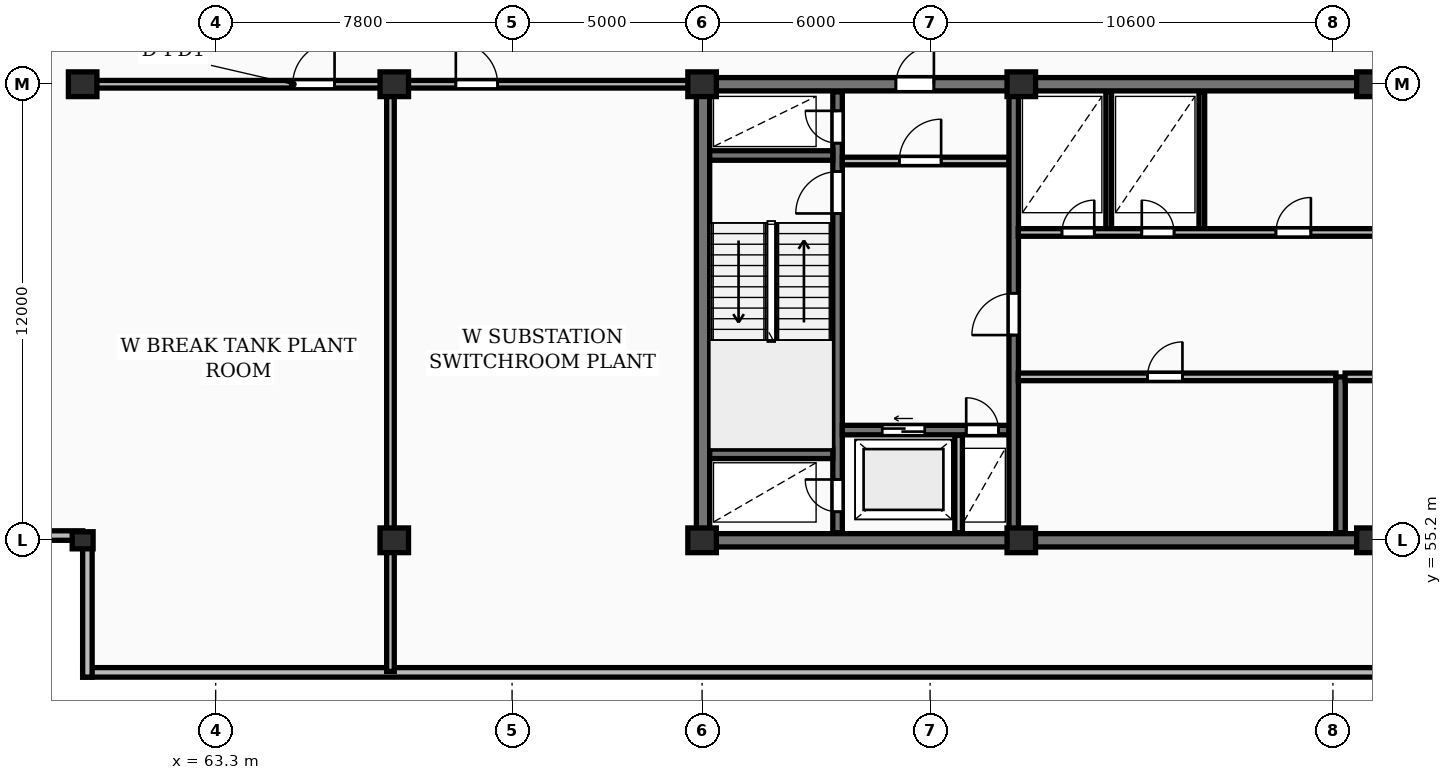
"""IFC4 building model, lengths in metres.
Left out: names, types, materials, properties, quantities, classifications, styles, units other than length and angle.
Written with IfcOpenShell. Run it as: python <this file> out.ifc"""

import sys

from ifc_helpers import new_model, si_unit, direction, frame, frame_2d, origin, origin_2d, place, context, subcontext, project, spatial, rectangle, extrude, element, fill, save


model = new_model("IFC4")
c1 = context("Model", 3, precision=1e-05, world=origin(), true_north=direction((0.0, 1.0)))
c2 = subcontext(c1, "Body", "Model", "MODEL_VIEW")
j1 = project(units=[si_unit("LENGTHUNIT", "METRE"), si_unit("PLANEANGLEUNIT", "RADIAN")], contexts=[c1])
p1 = place(None, origin())
s1 = spatial("IfcSite", under=j1, at=p1, CompositionType="ELEMENT")
p2 = place(p1, origin())
s2 = spatial("IfcBuilding", under=s1, at=p2, CompositionType="ELEMENT")
p3 = place(p2, frame((0.0, 0.0, 259.7)))
s3 = spatial("IfcBuildingStorey", under=s2, at=p3, CompositionType="ELEMENT", Elevation=259.7)
p4 = place(p3, frame((59.8, 55.2, 0.0), z_axis=(0.0, 0.0, 1.0), x_axis=(1.0, 0.0, 0.0)))
e1 = element("IfcColumn", 1, at=p4, inside=s3, PredefinedType="PILASTER", context=c2, shape_type="SweptSolid", body=[
    extrude(rectangle(XDim=0.55, YDim=0.45, at=origin_2d()), origin(), (0.0, 0.0, 1.0), 4.5),
])
for number, where, z_axis, x_axis in (
    (2, (59.8, 67.2, 0.0), (0.0, 0.0, 1.0), (1.0, 0.0, 0.0)),
    (3, (68.0, 55.2, 0.0), (0.0, 0.0, 1.0), (1.0, 0.0, 0.0)),
    (4, (68.0, 67.2, 0.0), (0.0, 0.0, 1.0), (1.0, 0.0, 0.0)),
    (5, (76.1, 55.2, 0.0), (0.0, 0.0, 1.0), (1.0, 0.0, 0.0)),
    (6, (76.1, 67.2, 0.0), (0.0, 0.0, 1.0), (1.0, 0.0, 0.0)),
    (7, (84.5, 55.2, 0.0), (0.0, 0.0, 1.0), (1.0, 0.0, 0.0)),
    (8, (84.5, 67.2, 0.0), (0.0, 0.0, 1.0), (1.0, 0.0, 0.0)),
    (9, (93.7, 55.2, 0.0), (0.0, 0.0, 1.0), (1.0, 0.0, 0.0)),
    (10, (93.7, 67.2, 0.0), (0.0, 0.0, 1.0), (1.0, 0.0, 0.0)),
):
    element("IfcColumn", number, at=place(p3, frame(where, z_axis=z_axis, x_axis=x_axis)), inside=s3, PredefinedType="COLUMN", context=c2, shape_type="SweptSolid", body=[
        extrude(rectangle(XDim=0.75, YDim=0.65, at=origin_2d()), origin(), (0.0, 0.0, 1.0), 4.5),
    ])
p5 = place(p3, frame((59.8, 51.725, 0.0), z_axis=(0.0, 0.0, 1.0), x_axis=(1.0, 0.0, 0.0)))
e11 = element("IfcWall", 11, at=p5, inside=s3, PredefinedType="SHEAR", context=c2, shape_type="SweptSolid", body=[
    extrude(rectangle(XDim=68.6, YDim=0.25, at=frame_2d((34.3, 0.0))), origin(), (0.0, 0.0, 1.0), 4.23),
])
p6 = place(p3, frame((56.2, 55.325, 0.0), z_axis=(0.0, 0.0, 1.0), x_axis=(1.0, 0.0, 0.0)))
e12 = element("IfcWall", 12, at=p6, inside=s3, PredefinedType="SHEAR", context=c2, shape_type="SweptSolid", body=[
    extrude(rectangle(XDim=3.6, YDim=0.25, at=frame_2d((1.8, 0.0))), origin(), (0.0, 0.0, 1.0), 4.23),
])
p7 = place(p3, frame((59.925, 55.2, 0.0), z_axis=(0.0, 0.0, 1.0), x_axis=(0.0, -1.0, 0.0)))
e13 = element("IfcWall", 13, at=p7, inside=s3, PredefinedType="SHEAR", context=c2, shape_type="SweptSolid", body=[
    extrude(rectangle(XDim=3.6, YDim=0.25, at=frame_2d((1.8, 0.0))), origin(), (0.0, 0.0, 1.0), 4.23),
])
p8 = place(p3, frame((75.95, 55.2, 0.0), z_axis=(0.0, 0.0, 1.0), x_axis=(1.0, 0.0, 0.0)))
e14 = element("IfcWall", 14, at=p8, inside=s3, PredefinedType="SHEAR", context=c2, shape_type="SweptSolid", body=[
    extrude(rectangle(XDim=36.3, YDim=0.35, at=frame_2d((18.15, 0.0))), origin(), (0.0, 0.0, 1.0), 4.5),
])
p9 = place(p3, frame((76.125, 55.375, 0.0), z_axis=(0.0, 0.0, 1.0), x_axis=(0.0, 1.0, 0.0)))
e15 = element("IfcWall", 15, at=p9, inside=s3, PredefinedType="SHEAR", context=c2, shape_type="SweptSolid", body=[
    extrude(rectangle(XDim=11.65, YDim=0.35, at=frame_2d((5.825, 0.0))), origin(), (0.0, 0.0, 1.0), 4.5),
])
p10 = place(p3, frame((75.95, 67.2, 0.0), z_axis=(0.0, 0.0, 1.0), x_axis=(1.0, 0.0, 0.0)))
e16 = element("IfcWall", 16, at=p10, inside=s3, PredefinedType="SHEAR", context=c2, shape_type="SweptSolid", body=[
    extrude(rectangle(XDim=36.3, YDim=0.35, at=frame_2d((18.15, 0.0))), origin(), (0.0, 0.0, 1.0), 4.5),
])
p11 = place(p10, frame((5.25, 0.0, 0.0)))
e17 = element("IfcOpeningElement", 17, at=p11, cuts=e16, PredefinedType="OPENING", context=c2, shape_type="SweptSolid", body=[
    extrude(rectangle(XDim=1.0, YDim=2.15, at=frame_2d((0.5, 1.075))), frame((0.0, 0.185, 0.0), z_axis=(0.0, -1.0, 0.0), x_axis=(1.0, 0.0, 0.0)), (0.0, 0.0, 1.0), 0.37),
])
p12 = place(p10, frame((21.6, 0.0, 0.0)))
e18 = element("IfcOpeningElement", 18, at=p12, cuts=e16, PredefinedType="OPENING", context=c2, shape_type="SweptSolid", body=[
    extrude(rectangle(XDim=1.5, YDim=2.2, at=frame_2d((0.75, 1.1))), frame((0.0, 0.185, 0.0), z_axis=(0.0, -1.0, 0.0), x_axis=(1.0, 0.0, 0.0)), (0.0, 0.0, 1.0), 0.37),
])
p13 = place(p10, frame((30.45, 0.0, 0.0)))
e19 = element("IfcOpeningElement", 19, at=p13, cuts=e16, PredefinedType="OPENING", context=c2, shape_type="SweptSolid", body=[
    extrude(rectangle(XDim=1.0, YDim=2.15, at=frame_2d((0.5, 1.075))), frame((0.0, 0.185, 0.0), z_axis=(0.0, -1.0, 0.0), x_axis=(1.0, 0.0, 0.0)), (0.0, 0.0, 1.0), 0.37),
])
p14 = place(p3, frame((79.665, 55.4, 0.0), z_axis=(0.0, 0.0, 1.0), x_axis=(0.0, 1.0, 0.0)))
e20 = element("IfcWall", 20, at=p14, inside=s3, PredefinedType="SHEAR", context=c2, shape_type="SweptSolid", body=[
    extrude(rectangle(XDim=11.6, YDim=0.25, at=frame_2d((5.8, 0.0))), origin(), (0.0, 0.0, 1.0), 4.5),
])
p15 = place(p14, frame((0.55, 0.0, 0.0)))
e21 = element("IfcOpeningElement", 21, at=p15, cuts=e20, PredefinedType="OPENING", context=c2, shape_type="SweptSolid", body=[
    extrude(rectangle(XDim=0.85, YDim=2.05, at=frame_2d((0.425, 1.025))), frame((0.0, 0.135, 0.0), z_axis=(0.0, -1.0, 0.0), x_axis=(1.0, 0.0, 0.0)), (0.0, 0.0, 1.0), 0.27),
])
p16 = place(p14, frame((8.4, 0.0, 0.0)))
e22 = element("IfcOpeningElement", 22, at=p16, cuts=e20, PredefinedType="OPENING", context=c2, shape_type="SweptSolid", body=[
    extrude(rectangle(XDim=1.1, YDim=2.1, at=frame_2d((0.55, 1.05))), frame((0.0, 0.135, 0.0), z_axis=(0.0, -1.0, 0.0), x_axis=(1.0, 0.0, 0.0)), (0.0, 0.0, 1.0), 0.27),
])
p17 = place(p14, frame((10.25, 0.0, 0.0)))
e23 = element("IfcOpeningElement", 23, at=p17, cuts=e20, PredefinedType="OPENING", context=c2, shape_type="SweptSolid", body=[
    extrude(rectangle(XDim=0.85, YDim=2.05, at=frame_2d((0.425, 1.025))), frame((0.0, 0.135, 0.0), z_axis=(0.0, -1.0, 0.0), x_axis=(1.0, 0.0, 0.0)), (0.0, 0.0, 1.0), 0.27),
])
for number, where, z_axis, x_axis in (
    (24, (76.3, 57.475, 0.0), (0.0, 0.0, 1.0), (1.0, 0.0, 0.0)),
    (25, (76.3, 65.325, 0.0), (0.0, 0.0, 1.0), (1.0, 0.0, 0.0)),
):
    element("IfcWall", number, at=place(p3, frame(where, z_axis=z_axis, x_axis=x_axis)), inside=s3, PredefinedType="SHEAR", context=c2, shape_type="SweptSolid", body=[
        extrude(rectangle(XDim=3.24, YDim=0.25, at=frame_2d((1.62, 0.0))), origin(), (0.0, 0.0, 1.0), 4.5),
    ])
p18 = place(p3, frame((79.79, 58.1, 0.0), z_axis=(0.0, 0.0, 1.0), x_axis=(1.0, 0.0, 0.0)))
e26 = element("IfcWall", 26, at=p18, inside=s3, PredefinedType="SHEAR", context=c2, shape_type="SweptSolid", body=[
    extrude(rectangle(XDim=4.39, YDim=0.25, at=frame_2d((2.195, 0.0))), origin(), (0.0, 0.0, 1.0), 4.5),
])
p19 = place(p18, frame((1.05, 0.0, 0.0)))
e27 = element("IfcOpeningElement", 27, at=p19, cuts=e26, PredefinedType="OPENING", context=c2, shape_type="SweptSolid", body=[
    extrude(rectangle(XDim=1.12, YDim=2.12, at=frame_2d((0.56, 1.06))), frame((0.0, 0.135, 0.0), z_axis=(0.0, -1.0, 0.0), x_axis=(1.0, 0.0, 0.0)), (0.0, 0.0, 1.0), 0.27),
])
p20 = place(p18, frame((3.26, 0.0, 0.0)))
e28 = element("IfcOpeningElement", 28, at=p20, cuts=e26, PredefinedType="OPENING", context=c2, shape_type="SweptSolid", body=[
    extrude(rectangle(XDim=0.85, YDim=2.05, at=frame_2d((0.425, 1.025))), frame((0.0, 0.135, 0.0), z_axis=(0.0, -1.0, 0.0), x_axis=(1.0, 0.0, 0.0)), (0.0, 0.0, 1.0), 0.27),
])
p21 = place(p3, frame((82.85, 55.4, 0.0), z_axis=(0.0, 0.0, 1.0), x_axis=(0.0, 1.0, 0.0)))
e29 = element("IfcWall", 29, at=p21, inside=s3, PredefinedType="PARTITIONING", context=c2, shape_type="SweptSolid", body=[
    extrude(rectangle(XDim=2.56, YDim=0.2, at=frame_2d((1.28, 0.0))), origin(), (0.0, 0.0, 1.0), 4.23),
])
p22 = place(p3, frame((79.79, 65.18, 0.0), z_axis=(0.0, 0.0, 1.0), x_axis=(1.0, 0.0, 0.0)))
e30 = element("IfcWall", 30, at=p22, inside=s3, PredefinedType="PARTITIONING", context=c2, shape_type="SweptSolid", body=[
    extrude(rectangle(XDim=4.39, YDim=0.2, at=frame_2d((2.195, 0.0))), origin(), (0.0, 0.0, 1.0), 4.23),
])
p23 = place(p22, frame((1.5, 0.0, 0.0)))
e31 = element("IfcOpeningElement", 31, at=p23, cuts=e30, PredefinedType="OPENING", context=c2, shape_type="SweptSolid", body=[
    extrude(rectangle(XDim=1.1, YDim=2.1, at=frame_2d((0.55, 1.05))), frame((0.0, 0.11, 0.0), z_axis=(0.0, -1.0, 0.0), x_axis=(1.0, 0.0, 0.0)), (0.0, 0.0, 1.0), 0.22),
])
p24 = place(p3, frame((84.3, 55.4, 0.0), z_axis=(0.0, 0.0, 1.0), x_axis=(0.0, 1.0, 0.0)))
e32 = element("IfcWall", 32, at=p24, inside=s3, PredefinedType="SHEAR", context=c2, shape_type="SweptSolid", body=[
    extrude(rectangle(XDim=11.6, YDim=0.25, at=frame_2d((5.8, 0.0))), origin(), (0.0, 0.0, 1.0), 4.5),
])
p25 = place(p24, frame((5.2, 0.0, 0.0)))
e33 = element("IfcOpeningElement", 33, at=p25, cuts=e32, PredefinedType="OPENING", context=c2, shape_type="SweptSolid", body=[
    extrude(rectangle(XDim=1.1, YDim=2.1, at=frame_2d((0.55, 1.05))), frame((0.0, 0.135, 0.0), z_axis=(0.0, -1.0, 0.0), x_axis=(1.0, 0.0, 0.0)), (0.0, 0.0, 1.0), 0.27),
])
p26 = place(p3, frame((84.42, 59.5, 0.0), z_axis=(0.0, 0.0, 1.0), x_axis=(1.0, 0.0, 0.0)))
e34 = element("IfcWall", 34, at=p26, inside=s3, PredefinedType="PARTITIONING", context=c2, shape_type="SweptSolid", body=[
    extrude(rectangle(XDim=8.36, YDim=0.2, at=frame_2d((4.18, 0.0))), origin(), (0.0, 0.0, 1.0), 4.23),
])
p27 = place(p26, frame((3.4, 0.0, 0.0)))
e35 = element("IfcOpeningElement", 35, at=p27, cuts=e34, PredefinedType="OPENING", context=c2, shape_type="SweptSolid", body=[
    extrude(rectangle(XDim=0.92, YDim=2.08, at=frame_2d((0.46, 1.04))), frame((0.0, 0.11, 0.0), z_axis=(0.0, -1.0, 0.0), x_axis=(1.0, 0.0, 0.0)), (0.0, 0.0, 1.0), 0.22),
])
p28 = place(p3, frame((92.9, 55.4, 0.0), z_axis=(0.0, 0.0, 1.0), x_axis=(0.0, 1.0, 0.0)))
e36 = element("IfcWall", 36, at=p28, inside=s3, PredefinedType="SHEAR", context=c2, shape_type="SweptSolid", body=[
    extrude(rectangle(XDim=4.1, YDim=0.25, at=frame_2d((2.05, 0.0))), origin(), (0.0, 0.0, 1.0), 4.5),
])
p29 = place(p3, frame((93.02, 59.5, 0.0), z_axis=(0.0, 0.0, 1.0), x_axis=(1.0, 0.0, 0.0)))
e37 = element("IfcWall", 37, at=p29, inside=s3, PredefinedType="PARTITIONING", context=c2, shape_type="SweptSolid", body=[
    extrude(rectangle(XDim=8.36, YDim=0.2, at=frame_2d((4.18, 0.0))), origin(), (0.0, 0.0, 1.0), 4.23),
])
p30 = place(p29, frame((3.4, 0.0, 0.0)))
e38 = element("IfcOpeningElement", 38, at=p30, cuts=e37, PredefinedType="OPENING", context=c2, shape_type="SweptSolid", body=[
    extrude(rectangle(XDim=0.92, YDim=2.08, at=frame_2d((0.46, 1.04))), frame((0.0, 0.11, 0.0), z_axis=(0.0, -1.0, 0.0), x_axis=(1.0, 0.0, 0.0)), (0.0, 0.0, 1.0), 0.22),
])
for number, where, z_axis, x_axis in (
    (39, (86.8, 63.4, 0.0), (0.0, 0.0, 1.0), (0.0, 1.0, 0.0)),
    (40, (89.25, 63.4, 0.0), (0.0, 0.0, 1.0), (0.0, 1.0, 0.0)),
):
    element("IfcWall", number, at=place(p3, frame(where, z_axis=z_axis, x_axis=x_axis)), inside=s3, PredefinedType="PARTITIONING", context=c2, shape_type="SweptSolid", body=[
        extrude(rectangle(XDim=3.6, YDim=0.15, at=frame_2d((1.8, 0.0))), origin(), (0.0, 0.0, 1.0), 4.23),
    ])
p31 = place(p3, frame((84.42, 63.3, 0.0), z_axis=(0.0, 0.0, 1.0), x_axis=(1.0, 0.0, 0.0)))
e41 = element("IfcWall", 41, at=p31, inside=s3, PredefinedType="PARTITIONING", context=c2, shape_type="SweptSolid", body=[
    extrude(rectangle(XDim=19.83, YDim=0.2, at=frame_2d((9.915, 0.0))), origin(), (0.0, 0.0, 1.0), 4.23),
])
p32 = place(p31, frame((1.15, 0.0, 0.0)))
e42 = element("IfcOpeningElement", 42, at=p32, cuts=e41, PredefinedType="OPENING", context=c2, shape_type="SweptSolid", body=[
    extrude(rectangle(XDim=0.85, YDim=2.05, at=frame_2d((0.425, 1.025))), frame((0.0, 0.11, 0.0), z_axis=(0.0, -1.0, 0.0), x_axis=(1.0, 0.0, 0.0)), (0.0, 0.0, 1.0), 0.22),
])
p33 = place(p31, frame((3.25, 0.0, 0.0)))
e43 = element("IfcOpeningElement", 43, at=p33, cuts=e41, PredefinedType="OPENING", context=c2, shape_type="SweptSolid", body=[
    extrude(rectangle(XDim=0.85, YDim=2.05, at=frame_2d((0.425, 1.025))), frame((0.0, 0.11, 0.0), z_axis=(0.0, -1.0, 0.0), x_axis=(1.0, 0.0, 0.0)), (0.0, 0.0, 1.0), 0.22),
])
p34 = place(p31, frame((13.08, 0.0, 0.0)))
e44 = element("IfcOpeningElement", 44, at=p34, cuts=e41, PredefinedType="OPENING", context=c2, shape_type="SweptSolid", body=[
    extrude(rectangle(XDim=1.5, YDim=2.2, at=frame_2d((0.75, 1.1))), frame((0.0, 0.11, 0.0), z_axis=(0.0, -1.0, 0.0), x_axis=(1.0, 0.0, 0.0)), (0.0, 0.0, 1.0), 0.22),
])
p35 = place(p31, frame((6.78, 0.0, 0.0)))
e45 = element("IfcOpeningElement", 45, at=p35, cuts=e41, PredefinedType="OPENING", context=c2, shape_type="SweptSolid", body=[
    extrude(rectangle(XDim=0.92, YDim=2.08, at=frame_2d((0.46, 1.04))), frame((0.0, 0.11, 0.0), z_axis=(0.0, -1.0, 0.0), x_axis=(1.0, 0.0, 0.0)), (0.0, 0.0, 1.0), 0.22),
])
p36 = place(p31, frame((16.28, 0.0, 0.0)))
e46 = element("IfcOpeningElement", 46, at=p36, cuts=e41, PredefinedType="OPENING", context=c2, shape_type="SweptSolid", body=[
    extrude(rectangle(XDim=0.92, YDim=2.08, at=frame_2d((0.46, 1.04))), frame((0.0, 0.11, 0.0), z_axis=(0.0, -1.0, 0.0), x_axis=(1.0, 0.0, 0.0)), (0.0, 0.0, 1.0), 0.22),
])
p37 = place(p3, frame((67.9, 51.75, 0.0), z_axis=(0.0, 0.0, 1.0), x_axis=(0.0, 1.0, 0.0)))
e47 = element("IfcWall", 47, at=p37, inside=s3, PredefinedType="PARTITIONING", context=c2, shape_type="SweptSolid", body=[
    extrude(rectangle(XDim=15.4, YDim=0.2, at=frame_2d((7.7, 0.0))), origin(), (0.0, 0.0, 1.0), 3.537),
])
p38 = place(p3, frame((59.85, 67.2, 0.0), z_axis=(0.0, 0.0, 1.0), x_axis=(1.0, 0.0, 0.0)))
e48 = element("IfcWall", 48, at=p38, inside=s3, PredefinedType="PARTITIONING", context=c2, shape_type="SweptSolid", body=[
    extrude(rectangle(XDim=16.1, YDim=0.2, at=frame_2d((8.05, 0.0))), origin(), (0.0, 0.0, 1.0), 3.61),
])
p39 = place(p38, frame((5.479, 0.0, 0.0)))
e49 = element("IfcOpeningElement", 49, at=p39, cuts=e48, PredefinedType="OPENING", context=c2, shape_type="SweptSolid", body=[
    extrude(rectangle(XDim=1.1, YDim=2.1, at=frame_2d((0.55, 1.05))), frame((0.0, 0.11, 0.0), z_axis=(0.0, -1.0, 0.0), x_axis=(1.0, 0.0, 0.0)), (0.0, 0.0, 1.0), 0.22),
])
p40 = place(p38, frame((9.77, 0.0, 0.0)))
e50 = element("IfcOpeningElement", 50, at=p40, cuts=e48, PredefinedType="OPENING", context=c2, shape_type="SweptSolid", body=[
    extrude(rectangle(XDim=1.1, YDim=2.1, at=frame_2d((0.55, 1.05))), frame((0.0, 0.11, 0.0), z_axis=(0.0, -1.0, 0.0), x_axis=(1.0, 0.0, 0.0)), (0.0, 0.0, 1.0), 0.22),
])
p41 = place(p11, origin())
e51 = element("IfcDoor", 51, at=p41, inside=s3, OperationType="SINGLE_SWING_RIGHT", PredefinedType="DOOR", context=c2, shape_type="SweptSolid", body=[
    extrude(rectangle(XDim=1.0, YDim=2.15, at=frame_2d((0.5, 1.075))), frame((0.0, 0.025, 0.0), z_axis=(0.0, -1.0, 0.0), x_axis=(1.0, 0.0, 0.0)), (0.0, 0.0, 1.0), 0.05),
])
fill(e17, e51)
p42 = place(p15, origin())
e52 = element("IfcDoor", 52, at=p42, inside=s3, OperationType="SINGLE_SWING_RIGHT", PredefinedType="DOOR", context=c2, shape_type="SweptSolid", body=[
    extrude(rectangle(XDim=0.85, YDim=2.05, at=frame_2d((0.425, 1.025))), frame((0.0, 0.025, 0.0), z_axis=(0.0, -1.0, 0.0), x_axis=(1.0, 0.0, 0.0)), (0.0, 0.0, 1.0), 0.05),
])
fill(e21, e52)
p43 = place(p16, origin())
e53 = element("IfcDoor", 53, at=p43, inside=s3, OperationType="SINGLE_SWING_LEFT", PredefinedType="DOOR", context=c2, shape_type="SweptSolid", body=[
    extrude(rectangle(XDim=1.1, YDim=2.1, at=frame_2d((0.55, 1.05))), frame((0.0, 0.025, 0.0), z_axis=(0.0, -1.0, 0.0), x_axis=(1.0, 0.0, 0.0)), (0.0, 0.0, 1.0), 0.05),
])
fill(e22, e53)
p44 = place(p17, origin())
e54 = element("IfcDoor", 54, at=p44, inside=s3, OperationType="SINGLE_SWING_RIGHT", PredefinedType="DOOR", context=c2, shape_type="SweptSolid", body=[
    extrude(rectangle(XDim=0.85, YDim=2.05, at=frame_2d((0.425, 1.025))), frame((0.0, 0.025, 0.0), z_axis=(0.0, -1.0, 0.0), x_axis=(1.0, 0.0, 0.0)), (0.0, 0.0, 1.0), 0.05),
])
fill(e23, e54)
p45 = place(p19, origin())
e55 = element("IfcDoor", 55, at=p45, inside=s3, OperationType="SLIDING_TO_LEFT", PredefinedType="DOOR", context=c2, shape_type="SweptSolid", body=[
    extrude(rectangle(XDim=1.12, YDim=2.12, at=frame_2d((0.56, 1.06))), frame((0.0, 0.025, 0.0), z_axis=(0.0, -1.0, 0.0), x_axis=(1.0, 0.0, 0.0)), (0.0, 0.0, 1.0), 0.05),
])
fill(e27, e55)
p46 = place(p20, origin())
e56 = element("IfcDoor", 56, at=p46, inside=s3, OperationType="SINGLE_SWING_LEFT", PredefinedType="DOOR", context=c2, shape_type="SweptSolid", body=[
    extrude(rectangle(XDim=0.85, YDim=2.05, at=frame_2d((0.425, 1.025))), frame((0.0, 0.025, 0.0), z_axis=(0.0, -1.0, 0.0), x_axis=(1.0, 0.0, 0.0)), (0.0, 0.0, 1.0), 0.05),
])
fill(e28, e56)
p47 = place(p23, origin())
e57 = element("IfcDoor", 57, at=p47, inside=s3, OperationType="SINGLE_SWING_RIGHT", PredefinedType="DOOR", context=c2, shape_type="SweptSolid", body=[
    extrude(rectangle(XDim=1.1, YDim=2.1, at=frame_2d((0.55, 1.05))), frame((0.0, 0.025, 0.0), z_axis=(0.0, -1.0, 0.0), x_axis=(1.0, 0.0, 0.0)), (0.0, 0.0, 1.0), 0.05),
])
fill(e31, e57)
p48 = place(p25, origin())
e58 = element("IfcDoor", 58, at=p48, inside=s3, OperationType="SINGLE_SWING_LEFT", PredefinedType="DOOR", context=c2, shape_type="SweptSolid", body=[
    extrude(rectangle(XDim=1.1, YDim=2.1, at=frame_2d((0.55, 1.05))), frame((0.0, 0.025, 0.0), z_axis=(0.0, -1.0, 0.0), x_axis=(1.0, 0.0, 0.0)), (0.0, 0.0, 1.0), 0.05),
])
fill(e33, e58)
p49 = place(p27, origin())
e59 = element("IfcDoor", 59, at=p49, inside=s3, OperationType="SINGLE_SWING_RIGHT", PredefinedType="DOOR", context=c2, shape_type="SweptSolid", body=[
    extrude(rectangle(XDim=0.92, YDim=2.08, at=frame_2d((0.46, 1.04))), frame((0.0, 0.025, 0.0), z_axis=(0.0, -1.0, 0.0), x_axis=(1.0, 0.0, 0.0)), (0.0, 0.0, 1.0), 0.05),
])
fill(e35, e59)
p50 = place(p32, origin())
e60 = element("IfcDoor", 60, at=p50, inside=s3, OperationType="SINGLE_SWING_RIGHT", PredefinedType="DOOR", context=c2, shape_type="SweptSolid", body=[
    extrude(rectangle(XDim=0.85, YDim=2.05, at=frame_2d((0.425, 1.025))), frame((0.0, 0.025, 0.0), z_axis=(0.0, -1.0, 0.0), x_axis=(1.0, 0.0, 0.0)), (0.0, 0.0, 1.0), 0.05),
])
fill(e42, e60)
p51 = place(p33, origin())
e61 = element("IfcDoor", 61, at=p51, inside=s3, OperationType="SINGLE_SWING_LEFT", PredefinedType="DOOR", context=c2, shape_type="SweptSolid", body=[
    extrude(rectangle(XDim=0.85, YDim=2.05, at=frame_2d((0.425, 1.025))), frame((0.0, 0.025, 0.0), z_axis=(0.0, -1.0, 0.0), x_axis=(1.0, 0.0, 0.0)), (0.0, 0.0, 1.0), 0.05),
])
fill(e43, e61)
p52 = place(p35, origin())
e62 = element("IfcDoor", 62, at=p52, inside=s3, OperationType="SINGLE_SWING_RIGHT", PredefinedType="DOOR", context=c2, shape_type="SweptSolid", body=[
    extrude(rectangle(XDim=0.92, YDim=2.08, at=frame_2d((0.46, 1.04))), frame((0.0, 0.025, 0.0), z_axis=(0.0, -1.0, 0.0), x_axis=(1.0, 0.0, 0.0)), (0.0, 0.0, 1.0), 0.05),
])
fill(e45, e62)
p53 = place(p39, origin())
e63 = element("IfcDoor", 63, at=p53, inside=s3, OperationType="SINGLE_SWING_RIGHT", PredefinedType="DOOR", context=c2, shape_type="SweptSolid", body=[
    extrude(rectangle(XDim=1.1, YDim=2.1, at=frame_2d((0.55, 1.05))), frame((0.0, 0.025, 0.0), z_axis=(0.0, -1.0, 0.0), x_axis=(1.0, 0.0, 0.0)), (0.0, 0.0, 1.0), 0.05),
])
fill(e49, e63)
p54 = place(p40, origin())
e64 = element("IfcDoor", 64, at=p54, inside=s3, OperationType="SINGLE_SWING_LEFT", PredefinedType="DOOR", context=c2, shape_type="SweptSolid", body=[
    extrude(rectangle(XDim=1.1, YDim=2.1, at=frame_2d((0.55, 1.05))), frame((0.0, 0.025, 0.0), z_axis=(0.0, -1.0, 0.0), x_axis=(1.0, 0.0, 0.0)), (0.0, 0.0, 1.0), 0.05),
])
fill(e50, e64)
save(model, sys.argv[1])
